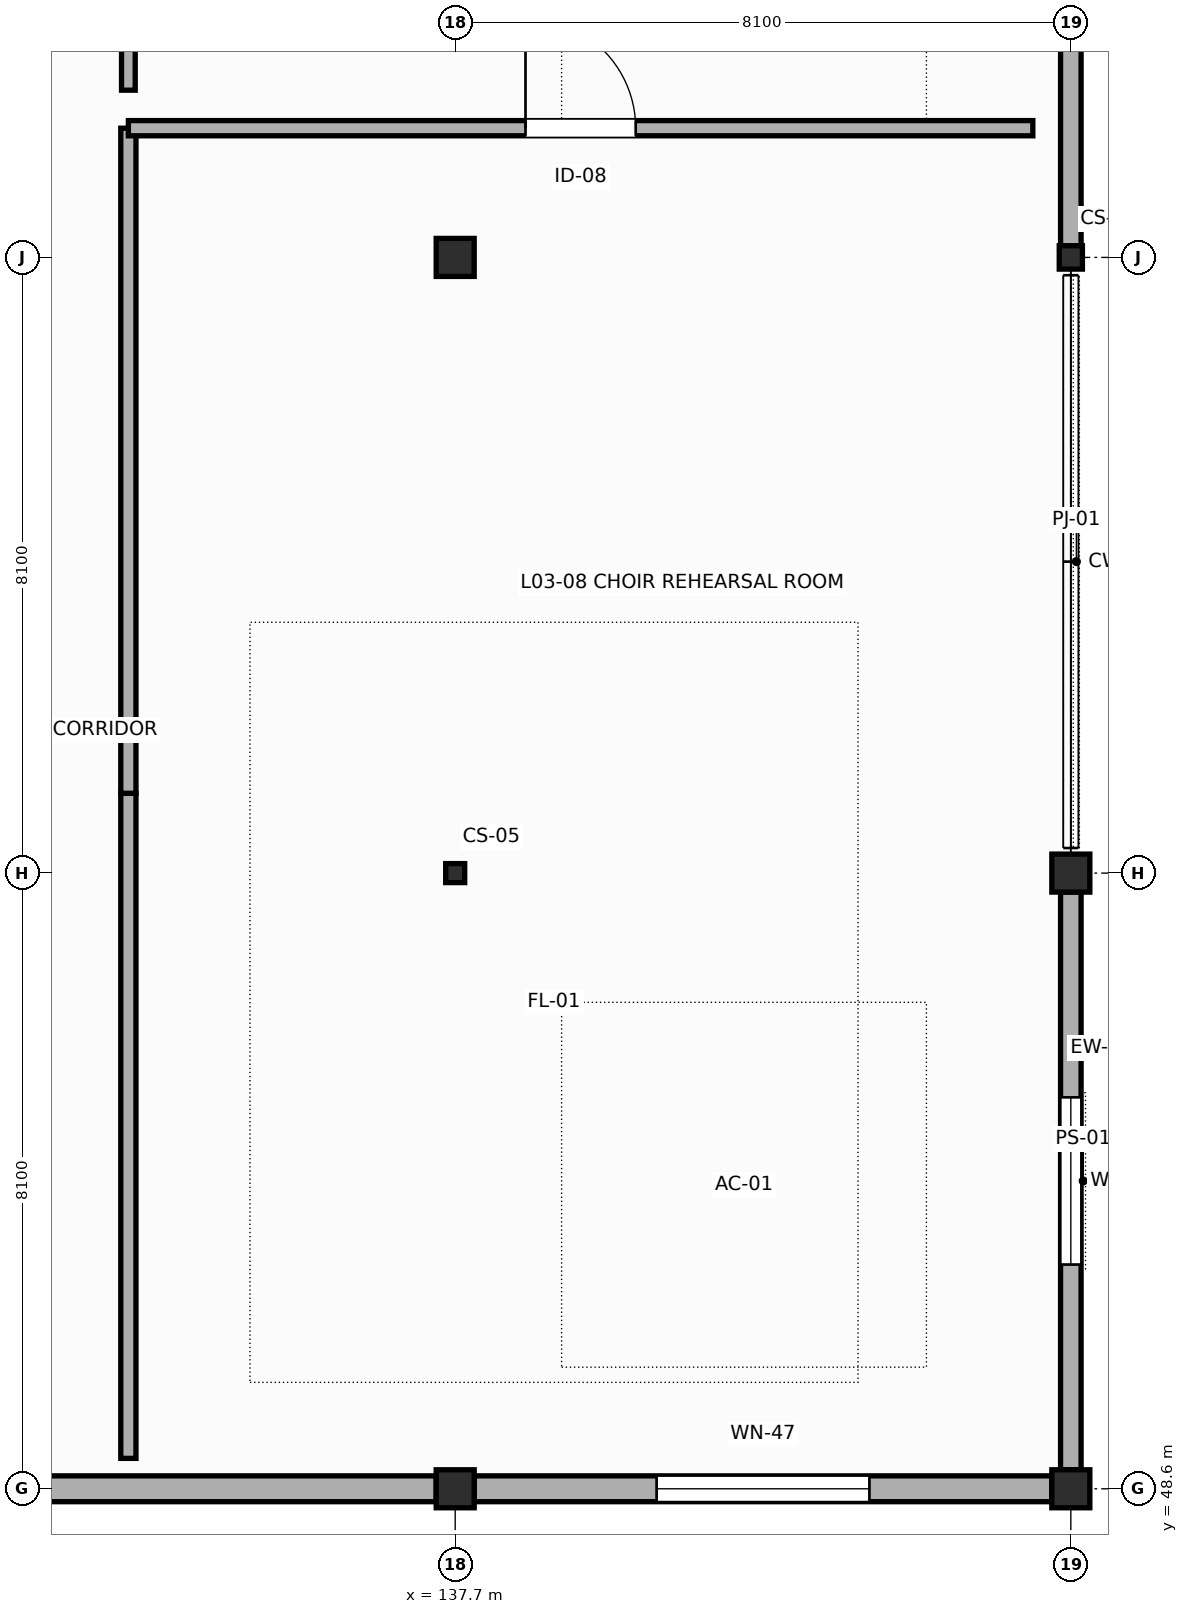
"""IFC4 building model, lengths in metres.
Left out: names, types, materials, properties, quantities, classifications, styles, units other than length and angle.
Written with IfcOpenShell. Run it as: python <this file> out.ifc"""

import sys

from ifc_helpers import new_model, si_unit, direction, frame, frame_2d, origin, origin_2d, place, context, subcontext, project, spatial, rectangle, hollow_rectangle, i_section, extrude, element, fill, save


model = new_model("IFC4")
c1 = context("Model", 3, precision=1e-05, world=origin(), true_north=direction((0.0, 1.0)))
c2 = subcontext(c1, "Body", "Model", "MODEL_VIEW")
j1 = project(units=[si_unit("LENGTHUNIT", "METRE"), si_unit("PLANEANGLEUNIT", "RADIAN")], contexts=[c1])
p1 = place(None, origin())
s1 = spatial("IfcSite", under=j1, at=p1, CompositionType="ELEMENT")
p2 = place(p1, origin())
s2 = spatial("IfcBuilding", under=s1, at=p2, CompositionType="ELEMENT")
p3 = place(p2, frame((0.0, 0.0, 15.0)))
s3 = spatial("IfcBuildingStorey", under=s2, at=p3, CompositionType="ELEMENT", Elevation=15.0)
p4 = place(p3, frame((137.7, 48.6, 0.0), z_axis=(0.0, 0.0, 1.0), x_axis=(1.0, 0.0, 0.0)))
e1 = element("IfcColumn", 1, at=p4, inside=s3, PredefinedType="COLUMN", context=c2, shape_type="SweptSolid", body=[
    extrude(rectangle(XDim=0.5, YDim=0.5, at=origin_2d()), origin(), (0.0, 0.0, 1.0), 4.2),
])
p5 = place(p3, frame((137.7, 56.7, 0.0), z_axis=(0.0, 0.0, 1.0), x_axis=(1.0, 0.0, 0.0)))
e2 = element("IfcColumn", 2, at=p5, inside=s3, PredefinedType="COLUMN", context=c2, shape_type="SweptSolid", body=[
    extrude(hollow_rectangle(XDim=0.25, YDim=0.25, WallThickness=0.012, InnerFilletRadius=0.012, OuterFilletRadius=0.025, at=origin_2d()), origin(), (0.0, 0.0, 1.0), 4.2),
])
for number, where, z_axis, x_axis in (
    (3, (137.7, 64.8, 0.0), (0.0, 0.0, 1.0), (1.0, 0.0, 0.0)),
    (4, (145.8, 48.6, 0.0), (0.0, 0.0, 1.0), (1.0, 0.0, 0.0)),
    (5, (145.8, 56.7, 0.0), (0.0, 0.0, 1.0), (1.0, 0.0, 0.0)),
):
    element("IfcColumn", number, at=place(p3, frame(where, z_axis=z_axis, x_axis=x_axis)), inside=s3, PredefinedType="COLUMN", context=c2, shape_type="SweptSolid", body=[
        extrude(rectangle(XDim=0.5, YDim=0.5, at=origin_2d()), origin(), (0.0, 0.0, 1.0), 4.2),
    ])
p6 = place(p3, frame((145.8, 64.8, 0.0), z_axis=(0.0, 0.0, 1.0), x_axis=(1.0, 0.0, 0.0)))
e6 = element("IfcColumn", 6, at=p6, inside=s3, PredefinedType="COLUMN", context=c2, shape_type="SweptSolid", body=[
    extrude(i_section(OverallWidth=0.305, OverallDepth=0.308, WebThickness=0.01, FlangeThickness=0.015, FilletRadius=0.015, at=origin_2d()), origin(), (0.0, 0.0, 1.0), 4.2),
])
p7 = place(p3, frame((145.8, 56.45, 0.0), z_axis=(0.0, 0.0, 1.0), x_axis=(0.0, -1.0, 0.0)))
e7 = element("IfcWall", 7, at=p7, inside=s3, PredefinedType="SOLIDWALL", context=c2, shape_type="SweptSolid", body=[
    extrude(rectangle(XDim=7.6, YDim=0.27, at=frame_2d((3.8, 0.0))), origin(), (0.0, 0.0, 1.0), 3.587),
])
p8 = place(p7, frame((2.7, 0.0, 0.9)))
e8 = element("IfcOpeningElement", 8, at=p8, cuts=e7, PredefinedType="OPENING", context=c2, shape_type="SweptSolid", body=[
    extrude(rectangle(XDim=2.2, YDim=2.4, at=frame_2d((1.1, 1.2))), frame((0.0, 0.145, 0.0), z_axis=(0.0, -1.0, 0.0), x_axis=(1.0, 0.0, 0.0)), (0.0, 0.0, 1.0), 0.29),
])
p9 = place(p3, frame((145.8, 72.9, 0.0), z_axis=(0.0, 0.0, 1.0), x_axis=(0.0, -1.0, 0.0)))
e9 = element("IfcWall", 9, at=p9, inside=s3, PredefinedType="SOLIDWALL", context=c2, shape_type="SweptSolid", body=[
    extrude(rectangle(XDim=8.1, YDim=0.27, at=frame_2d((4.05, 0.0))), origin(), (0.0, 0.0, 1.0), 3.587),
])
p10 = place(p9, frame((2.85, 0.0, 0.9)))
e10 = element("IfcOpeningElement", 10, at=p10, cuts=e9, PredefinedType="OPENING", context=c2, shape_type="SweptSolid", body=[
    extrude(rectangle(XDim=2.4, YDim=1.6, at=frame_2d((1.2, 0.8))), frame((0.0, 0.145, 0.0), z_axis=(0.0, -1.0, 0.0), x_axis=(1.0, 0.0, 0.0)), (0.0, 0.0, 1.0), 0.29),
])
p11 = place(p3, frame((129.85, 48.6, 0.0), z_axis=(0.0, 0.0, 1.0), x_axis=(1.0, 0.0, 0.0)))
e11 = element("IfcWall", 11, at=p11, inside=s3, PredefinedType="SOLIDWALL", context=c2, shape_type="SweptSolid", body=[
    extrude(rectangle(XDim=7.6, YDim=0.34, at=frame_2d((3.8, 0.0))), origin(), (0.0, 0.0, 1.0), 3.475),
])
p12 = place(p3, frame((137.95, 48.6, 0.0), z_axis=(0.0, 0.0, 1.0), x_axis=(1.0, 0.0, 0.0)))
e12 = element("IfcWall", 12, at=p12, inside=s3, PredefinedType="SOLIDWALL", context=c2, shape_type="SweptSolid", body=[
    extrude(rectangle(XDim=7.6, YDim=0.34, at=frame_2d((3.8, 0.0))), origin(), (0.0, 0.0, 1.0), 3.527),
])
p13 = place(p12, frame((2.4, 0.0, 0.9)))
e13 = element("IfcOpeningElement", 13, at=p13, cuts=e12, PredefinedType="OPENING", context=c2, shape_type="SweptSolid", body=[
    extrude(rectangle(XDim=2.8, YDim=2.1, at=frame_2d((1.4, 1.05))), frame((0.0, 0.18, 0.0), z_axis=(0.0, -1.0, 0.0), x_axis=(1.0, 0.0, 0.0)), (0.0, 0.0, 1.0), 0.36),
])
for number, where, z_axis, x_axis in (
    (14, (133.4, 49.0, 0.0), (0.0, 0.0, 1.0), (0.0, 1.0, 0.0)),
    (15, (133.4, 57.75, 0.0), (0.0, 0.0, 1.0), (0.0, 1.0, 0.0)),
):
    element("IfcWall", number, at=place(p3, frame(where, z_axis=z_axis, x_axis=x_axis)), inside=s3, PredefinedType="PARTITIONING", context=c2, shape_type="SweptSolid", body=[
        extrude(rectangle(XDim=8.75, YDim=0.2, at=frame_2d((4.375, 0.0))), origin(), (0.0, 0.0, 1.0), 3.92),
    ])
p14 = place(p3, frame((133.4, 66.5, 0.0), z_axis=(0.0, 0.0, 1.0), x_axis=(1.0, 0.0, 0.0)))
e16 = element("IfcWall", 16, at=p14, inside=s3, PredefinedType="PARTITIONING", context=c2, shape_type="SweptSolid", body=[
    extrude(rectangle(XDim=11.9, YDim=0.2, at=frame_2d((5.95, 0.0))), origin(), (0.0, 0.0, 1.0), 3.92),
])
p15 = place(p14, frame((5.225, 0.0, 0.0)))
e17 = element("IfcOpeningElement", 17, at=p15, cuts=e16, PredefinedType="OPENING", context=c2, shape_type="SweptSolid", body=[
    extrude(rectangle(XDim=1.45, YDim=2.35, at=frame_2d((0.725, 1.175))), frame((0.0, 0.11, 0.0), z_axis=(0.0, -1.0, 0.0), x_axis=(1.0, 0.0, 0.0)), (0.0, 0.0, 1.0), 0.22),
])
p16 = place(p3, frame((133.4, 67.0, 0.0), z_axis=(0.0, 0.0, 1.0), x_axis=(0.0, 1.0, 0.0)))
e18 = element("IfcWall", 18, at=p16, inside=s3, PredefinedType="PARTITIONING", context=c2, shape_type="SweptSolid", body=[
    extrude(rectangle(XDim=9.5, YDim=0.18, at=frame_2d((4.75, 0.0))), origin(), (0.0, 0.0, 1.0), 3.92),
])
p17 = place(p8, origin())
e19 = element("IfcWindow", 19, at=p17, inside=s3, PartitioningType="SINGLE_PANEL", PredefinedType="WINDOW", context=c2, shape_type="SweptSolid", body=[
    extrude(rectangle(XDim=2.2, YDim=2.4, at=frame_2d((1.1, 1.2))), frame((0.0, 0.03, 0.0), z_axis=(0.0, -1.0, 0.0), x_axis=(1.0, 0.0, 0.0)), (0.0, 0.0, 1.0), 0.06),
])
fill(e8, e19)
p18 = place(p13, origin())
e20 = element("IfcWindow", 20, at=p18, inside=s3, PartitioningType="SINGLE_PANEL", PredefinedType="WINDOW", context=c2, shape_type="SweptSolid", body=[
    extrude(rectangle(XDim=2.8, YDim=2.1, at=frame_2d((1.4, 1.05))), frame((0.0, 0.03, 0.0), z_axis=(0.0, -1.0, 0.0), x_axis=(1.0, 0.0, 0.0)), (0.0, 0.0, 1.0), 0.06),
])
fill(e13, e20)
p19 = place(p15, origin())
e21 = element("IfcDoor", 21, at=p19, inside=s3, OperationType="SINGLE_SWING_LEFT", PredefinedType="DOOR", context=c2, shape_type="SweptSolid", body=[
    extrude(rectangle(XDim=1.45, YDim=2.35, at=frame_2d((0.725, 1.175))), frame((0.0, 0.025, 0.0), z_axis=(0.0, -1.0, 0.0), x_axis=(1.0, 0.0, 0.0)), (0.0, 0.0, 1.0), 0.05),
])
fill(e17, e21)
save(model, sys.argv[1])
